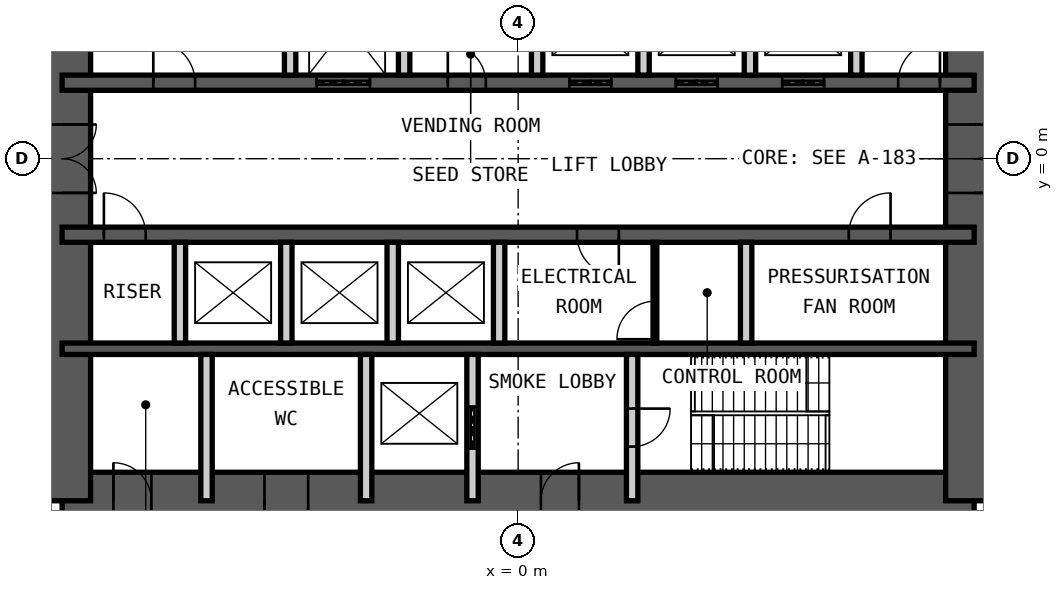
"""IFC4 building model, lengths in metres.
Left out: names, types, materials, properties, quantities, classifications, styles, units other than length and angle.
Written with IfcOpenShell. Run it as: python <this file> out.ifc"""

import sys

from ifc_helpers import new_model, si_unit, direction, frame, frame_2d, origin, place, context, subcontext, project, spatial, rectangle, extrude, element, fill, save


model = new_model("IFC4")
c1 = context("Model", 3, precision=1e-05, world=origin(), true_north=direction((0.0, 1.0)))
c2 = subcontext(c1, "Body", "Model", "MODEL_VIEW")
j1 = project(units=[si_unit("LENGTHUNIT", "METRE"), si_unit("PLANEANGLEUNIT", "RADIAN")], contexts=[c1])
p1 = place(None, origin())
s1 = spatial("IfcSite", under=j1, at=p1, CompositionType="ELEMENT")
p2 = place(p1, origin())
s2 = spatial("IfcBuilding", under=s1, at=p2, CompositionType="ELEMENT")
p3 = place(p2, frame((0.0, 0.0, 87.0)))
s3 = spatial("IfcBuildingStorey", under=s2, at=p3, CompositionType="ELEMENT", Elevation=87.0)
p4 = place(p3, frame((-12.0, -9.0, 0.0), z_axis=(0.0, 0.0, 1.0), x_axis=(1.0, 0.0, 0.0)))
e1 = element("IfcWall", 1, at=p4, inside=s3, PredefinedType="SHEAR", context=c2, shape_type="SweptSolid", body=[
    extrude(rectangle(XDim=24.0, YDim=1.5, at=frame_2d((12.0, 0.0))), origin(), (0.0, 0.0, 1.0), 5.0),
])
p5 = place(p4, frame((1.35, 0.0, 0.0)))
e2 = element("IfcOpeningElement", 2, at=p5, cuts=e1, PredefinedType="OPENING", context=c2, shape_type="SweptSolid", body=[
    extrude(rectangle(XDim=1.0, YDim=2.1, at=frame_2d((0.5, 1.05))), frame((0.0, 0.76, 0.0), z_axis=(0.0, -1.0, 0.0), x_axis=(1.0, 0.0, 0.0)), (0.0, 0.0, 1.0), 1.52),
])
p6 = place(p4, frame((5.325, 0.0, 0.0)))
e3 = element("IfcOpeningElement", 3, at=p6, cuts=e1, PredefinedType="OPENING", context=c2, shape_type="SweptSolid", body=[
    extrude(rectangle(XDim=1.15, YDim=2.1, at=frame_2d((0.575, 1.05))), frame((0.0, 0.76, 0.0), z_axis=(0.0, -1.0, 0.0), x_axis=(1.0, 0.0, 0.0)), (0.0, 0.0, 1.0), 1.52),
])
p7 = place(p4, frame((12.6, 0.0, 0.0)))
e4 = element("IfcOpeningElement", 4, at=p7, cuts=e1, PredefinedType="OPENING", context=c2, shape_type="SweptSolid", body=[
    extrude(rectangle(XDim=1.0, YDim=2.1, at=frame_2d((0.5, 1.05))), frame((0.0, 0.76, 0.0), z_axis=(0.0, -1.0, 0.0), x_axis=(1.0, 0.0, 0.0)), (0.0, 0.0, 1.0), 1.52),
])
p8 = place(p3, frame((12.0, -9.0, 0.0), z_axis=(0.0, 0.0, 1.0), x_axis=(0.0, 1.0, 0.0)))
e5 = element("IfcWall", 5, at=p8, inside=s3, PredefinedType="SHEAR", context=c2, shape_type="SweptSolid", body=[
    extrude(rectangle(XDim=18.0, YDim=1.5, at=frame_2d((9.0, 0.0))), origin(), (0.0, 0.0, 1.0), 5.0),
])
p9 = place(p8, frame((8.1, 0.0, 0.0)))
e6 = element("IfcOpeningElement", 6, at=p9, cuts=e5, PredefinedType="OPENING", context=c2, shape_type="SweptSolid", body=[
    extrude(rectangle(XDim=1.8, YDim=2.1, at=frame_2d((0.9, 1.05))), frame((0.0, 0.76, 0.0), z_axis=(0.0, -1.0, 0.0), x_axis=(1.0, 0.0, 0.0)), (0.0, 0.0, 1.0), 1.52),
])
p10 = place(p3, frame((-12.0, -9.0, 0.0), z_axis=(0.0, 0.0, 1.0), x_axis=(0.0, 1.0, 0.0)))
e7 = element("IfcWall", 7, at=p10, inside=s3, PredefinedType="SHEAR", context=c2, shape_type="SweptSolid", body=[
    extrude(rectangle(XDim=18.0, YDim=1.5, at=frame_2d((9.0, 0.0))), origin(), (0.0, 0.0, 1.0), 5.0),
])
p11 = place(p10, frame((8.1, 0.0, 0.0)))
e8 = element("IfcOpeningElement", 8, at=p11, cuts=e7, PredefinedType="OPENING", context=c2, shape_type="SweptSolid", body=[
    extrude(rectangle(XDim=1.8, YDim=2.1, at=frame_2d((0.9, 1.05))), frame((0.0, 0.76, 0.0), z_axis=(0.0, -1.0, 0.0), x_axis=(1.0, 0.0, 0.0)), (0.0, 0.0, 1.0), 1.52),
])
p12 = place(p3, frame((-12.0, 2.0, 0.0), z_axis=(0.0, 0.0, 1.0), x_axis=(1.0, 0.0, 0.0)))
e9 = element("IfcWall", 9, at=p12, inside=s3, PredefinedType="SHEAR", context=c2, shape_type="SweptSolid", body=[
    extrude(rectangle(XDim=24.0, YDim=0.4, at=frame_2d((12.0, 0.0))), origin(), (0.0, 0.0, 1.0), 5.0),
])
p13 = place(p12, frame((2.4, 0.0, 0.0)))
e10 = element("IfcOpeningElement", 10, at=p13, cuts=e9, PredefinedType="OPENING", context=c2, shape_type="SweptSolid", body=[
    extrude(rectangle(XDim=1.1, YDim=2.1, at=frame_2d((0.55, 1.05))), frame((0.0, 0.21, 0.0), z_axis=(0.0, -1.0, 0.0), x_axis=(1.0, 0.0, 0.0)), (0.0, 0.0, 1.0), 0.42),
])
p14 = place(p12, frame((22.0, 0.0, 0.0)))
e11 = element("IfcOpeningElement", 11, at=p14, cuts=e9, PredefinedType="OPENING", context=c2, shape_type="SweptSolid", body=[
    extrude(rectangle(XDim=1.1, YDim=2.1, at=frame_2d((0.55, 1.05))), frame((0.0, 0.21, 0.0), z_axis=(0.0, -1.0, 0.0), x_axis=(1.0, 0.0, 0.0)), (0.0, 0.0, 1.0), 0.42),
])
p15 = place(p12, frame((10.15, 0.0, 0.0)))
e12 = element("IfcOpeningElement", 12, at=p15, cuts=e9, PredefinedType="OPENING", context=c2, shape_type="SweptSolid", body=[
    extrude(rectangle(XDim=1.0, YDim=2.1, at=frame_2d((0.5, 1.05))), frame((0.0, 0.21, 0.0), z_axis=(0.0, -1.0, 0.0), x_axis=(1.0, 0.0, 0.0)), (0.0, 0.0, 1.0), 0.42),
])
p16 = place(p12, frame((6.7, 0.0, 0.0)))
e13 = element("IfcOpeningElement", 13, at=p16, cuts=e9, PredefinedType="OPENING", context=c2, shape_type="SweptSolid", body=[
    extrude(rectangle(XDim=1.4, YDim=2.4, at=frame_2d((0.7, 1.2))), frame((0.0, 0.21, 0.0), z_axis=(0.0, -1.0, 0.0), x_axis=(1.0, 0.0, 0.0)), (0.0, 0.0, 1.0), 0.42),
])
p17 = place(p12, frame((13.35, 0.0, 0.0)))
e14 = element("IfcOpeningElement", 14, at=p17, cuts=e9, PredefinedType="OPENING", context=c2, shape_type="SweptSolid", body=[
    extrude(rectangle(XDim=1.1, YDim=2.4, at=frame_2d((0.55, 1.2))), frame((0.0, 0.21, 0.0), z_axis=(0.0, -1.0, 0.0), x_axis=(1.0, 0.0, 0.0)), (0.0, 0.0, 1.0), 0.42),
])
p18 = place(p12, frame((16.15, 0.0, 0.0)))
e15 = element("IfcOpeningElement", 15, at=p18, cuts=e9, PredefinedType="OPENING", context=c2, shape_type="SweptSolid", body=[
    extrude(rectangle(XDim=1.1, YDim=2.4, at=frame_2d((0.55, 1.2))), frame((0.0, 0.21, 0.0), z_axis=(0.0, -1.0, 0.0), x_axis=(1.0, 0.0, 0.0)), (0.0, 0.0, 1.0), 0.42),
])
p19 = place(p12, frame((18.95, 0.0, 0.0)))
e16 = element("IfcOpeningElement", 16, at=p19, cuts=e9, PredefinedType="OPENING", context=c2, shape_type="SweptSolid", body=[
    extrude(rectangle(XDim=1.1, YDim=2.4, at=frame_2d((0.55, 1.2))), frame((0.0, 0.21, 0.0), z_axis=(0.0, -1.0, 0.0), x_axis=(1.0, 0.0, 0.0)), (0.0, 0.0, 1.0), 0.42),
])
p20 = place(p3, frame((-12.0, -2.0, 0.0), z_axis=(0.0, 0.0, 1.0), x_axis=(1.0, 0.0, 0.0)))
e17 = element("IfcWall", 17, at=p20, inside=s3, PredefinedType="SHEAR", context=c2, shape_type="SweptSolid", body=[
    extrude(rectangle(XDim=24.0, YDim=0.4, at=frame_2d((12.0, 0.0))), origin(), (0.0, 0.0, 1.0), 5.0),
])
p21 = place(p20, frame((1.1, 0.0, 0.0)))
e18 = element("IfcOpeningElement", 18, at=p21, cuts=e17, PredefinedType="OPENING", context=c2, shape_type="SweptSolid", body=[
    extrude(rectangle(XDim=1.1, YDim=2.1, at=frame_2d((0.55, 1.05))), frame((0.0, 0.21, 0.0), z_axis=(0.0, -1.0, 0.0), x_axis=(1.0, 0.0, 0.0)), (0.0, 0.0, 1.0), 0.42),
])
p22 = place(p20, frame((13.55, 0.0, 0.0)))
e19 = element("IfcOpeningElement", 19, at=p22, cuts=e17, PredefinedType="OPENING", context=c2, shape_type="SweptSolid", body=[
    extrude(rectangle(XDim=1.1, YDim=2.1, at=frame_2d((0.55, 1.05))), frame((0.0, 0.21, 0.0), z_axis=(0.0, -1.0, 0.0), x_axis=(1.0, 0.0, 0.0)), (0.0, 0.0, 1.0), 0.42),
])
p23 = place(p20, frame((20.7, 0.0, 0.0)))
e20 = element("IfcOpeningElement", 20, at=p23, cuts=e17, PredefinedType="OPENING", context=c2, shape_type="SweptSolid", body=[
    extrude(rectangle(XDim=1.1, YDim=2.1, at=frame_2d((0.55, 1.05))), frame((0.0, 0.21, 0.0), z_axis=(0.0, -1.0, 0.0), x_axis=(1.0, 0.0, 0.0)), (0.0, 0.0, 1.0), 0.42),
])
p24 = place(p3, frame((-12.0, -5.0, 0.0), z_axis=(0.0, 0.0, 1.0), x_axis=(1.0, 0.0, 0.0)))
e21 = element("IfcWall", 21, at=p24, inside=s3, PredefinedType="SHEAR", context=c2, shape_type="SweptSolid", body=[
    extrude(rectangle(XDim=24.0, YDim=0.3, at=frame_2d((12.0, 0.0))), origin(), (0.0, 0.0, 1.0), 5.0),
])
for number, where, z_axis, x_axis in (
    (22, (-6.0, 2.2, 0.0), (0.0, 0.0, 1.0), (0.0, 1.0, 0.0)),
    (23, (-3.0, 2.2, 0.0), (0.0, 0.0, 1.0), (0.0, 1.0, 0.0)),
    (24, (0.5, 2.2, 0.0), (0.0, 0.0, 1.0), (0.0, 1.0, 0.0)),
    (25, (3.3, 2.2, 0.0), (0.0, 0.0, 1.0), (0.0, 1.0, 0.0)),
    (26, (6.1, 2.2, 0.0), (0.0, 0.0, 1.0), (0.0, 1.0, 0.0)),
    (27, (8.9, 2.2, 0.0), (0.0, 0.0, 1.0), (0.0, 1.0, 0.0)),
    (28, (-8.9, -4.85, 0.0), (0.0, 0.0, 1.0), (0.0, 1.0, 0.0)),
    (29, (-6.1, -4.85, 0.0), (0.0, 0.0, 1.0), (0.0, 1.0, 0.0)),
    (30, (-3.3, -4.85, 0.0), (0.0, 0.0, 1.0), (0.0, 1.0, 0.0)),
    (31, (-0.5, -4.85, 0.0), (0.0, 0.0, 1.0), (0.0, 1.0, 0.0)),
    (32, (6.0, -4.85, 0.0), (0.0, 0.0, 1.0), (0.0, 1.0, 0.0)),
):
    element("IfcWall", number, at=place(p3, frame(where, z_axis=z_axis, x_axis=x_axis)), inside=s3, PredefinedType="PARTITIONING", context=c2, shape_type="SweptSolid", body=[
        extrude(rectangle(XDim=2.65, YDim=0.3, at=frame_2d((1.325, 0.0))), origin(), (0.0, 0.0, 1.0), 4.78),
    ])
for number, where, z_axis, x_axis in (
    (33, (-8.2, -9.0, 0.0), (0.0, 0.0, 1.0), (0.0, 1.0, 0.0)),
    (34, (-4.0, -9.0, 0.0), (0.0, 0.0, 1.0), (0.0, 1.0, 0.0)),
):
    element("IfcWall", number, at=place(p3, frame(where, z_axis=z_axis, x_axis=x_axis)), inside=s3, PredefinedType="PARTITIONING", context=c2, shape_type="SweptSolid", body=[
        extrude(rectangle(XDim=3.85, YDim=0.3, at=frame_2d((1.925, 0.0))), origin(), (0.0, 0.0, 1.0), 4.78),
    ])
p25 = place(p3, frame((-1.2, -9.0, 0.0), z_axis=(0.0, 0.0, 1.0), x_axis=(0.0, 1.0, 0.0)))
e35 = element("IfcWall", 35, at=p25, inside=s3, PredefinedType="PARTITIONING", context=c2, shape_type="SweptSolid", body=[
    extrude(rectangle(XDim=3.85, YDim=0.3, at=frame_2d((1.925, 0.0))), origin(), (0.0, 0.0, 1.0), 4.78),
])
p26 = place(p25, frame((1.375, 0.0, 0.0)))
e36 = element("IfcOpeningElement", 36, at=p26, cuts=e35, PredefinedType="OPENING", context=c2, shape_type="SweptSolid", body=[
    extrude(rectangle(XDim=1.1, YDim=2.4, at=frame_2d((0.55, 1.2))), frame((0.0, 0.16, 0.0), z_axis=(0.0, -1.0, 0.0), x_axis=(1.0, 0.0, 0.0)), (0.0, 0.0, 1.0), 0.32),
])
p27 = place(p3, frame((3.0, -9.0, 0.0), z_axis=(0.0, 0.0, 1.0), x_axis=(0.0, 1.0, 0.0)))
e37 = element("IfcWall", 37, at=p27, inside=s3, PredefinedType="PARTITIONING", context=c2, shape_type="SweptSolid", body=[
    extrude(rectangle(XDim=3.85, YDim=0.3, at=frame_2d((1.925, 0.0))), origin(), (0.0, 0.0, 1.0), 4.78),
])
p28 = place(p27, frame((1.425, 0.0, 0.0)))
e38 = element("IfcOpeningElement", 38, at=p28, cuts=e37, PredefinedType="OPENING", context=c2, shape_type="SweptSolid", body=[
    extrude(rectangle(XDim=1.0, YDim=2.1, at=frame_2d((0.5, 1.05))), frame((0.0, 0.16, 0.0), z_axis=(0.0, -1.0, 0.0), x_axis=(1.0, 0.0, 0.0)), (0.0, 0.0, 1.0), 0.32),
])
p29 = place(p3, frame((3.6, -4.85, 0.0), z_axis=(0.0, 0.0, 1.0), x_axis=(0.0, 1.0, 0.0)))
e39 = element("IfcWall", 39, at=p29, inside=s3, PredefinedType="PARTITIONING", context=c2, shape_type="SweptSolid", body=[
    extrude(rectangle(XDim=2.65, YDim=0.1, at=frame_2d((1.325, 0.0))), origin(), (0.0, 0.0, 1.0), 4.78),
])
p30 = place(p29, frame((0.1, 0.0, 0.0)))
e40 = element("IfcOpeningElement", 40, at=p30, cuts=e39, PredefinedType="OPENING", context=c2, shape_type="SweptSolid", body=[
    extrude(rectangle(XDim=1.0, YDim=2.4, at=frame_2d((0.5, 1.2))), frame((0.0, 0.06, 0.0), z_axis=(0.0, -1.0, 0.0), x_axis=(1.0, 0.0, 0.0)), (0.0, 0.0, 1.0), 0.12),
])
p31 = place(p5, origin())
e41 = element("IfcDoor", 41, at=p31, inside=s3, OperationType="SINGLE_SWING_RIGHT", PredefinedType="DOOR", context=c2, shape_type="SweptSolid", body=[
    extrude(rectangle(XDim=1.0, YDim=2.1, at=frame_2d((0.5, 1.05))), frame((0.0, 0.025, 0.0), z_axis=(0.0, -1.0, 0.0), x_axis=(1.0, 0.0, 0.0)), (0.0, 0.0, 1.0), 0.05),
])
fill(e2, e41)
p32 = place(p6, origin())
e42 = element("IfcDoor", 42, at=p32, inside=s3, OperationType="SINGLE_SWING_LEFT", PredefinedType="DOOR", context=c2, shape_type="SweptSolid", body=[
    extrude(rectangle(XDim=1.15, YDim=2.1, at=frame_2d((0.575, 1.05))), frame((0.0, 0.025, 0.0), z_axis=(0.0, -1.0, 0.0), x_axis=(1.0, 0.0, 0.0)), (0.0, 0.0, 1.0), 0.05),
])
fill(e3, e42)
p33 = place(p7, origin())
e43 = element("IfcDoor", 43, at=p33, inside=s3, OperationType="SINGLE_SWING_LEFT", PredefinedType="DOOR", context=c2, shape_type="SweptSolid", body=[
    extrude(rectangle(XDim=1.0, YDim=2.1, at=frame_2d((0.5, 1.05))), frame((0.0, 0.025, 0.0), z_axis=(0.0, -1.0, 0.0), x_axis=(1.0, 0.0, 0.0)), (0.0, 0.0, 1.0), 0.05),
])
fill(e4, e43)
p34 = place(p28, origin())
e44 = element("IfcDoor", 44, at=p34, inside=s3, OperationType="SINGLE_SWING_RIGHT", PredefinedType="DOOR", context=c2, shape_type="SweptSolid", body=[
    extrude(rectangle(XDim=1.0, YDim=2.1, at=frame_2d((0.5, 1.05))), frame((0.0, 0.025, 0.0), z_axis=(0.0, -1.0, 0.0), x_axis=(1.0, 0.0, 0.0)), (0.0, 0.0, 1.0), 0.05),
])
fill(e38, e44)
p35 = place(p13, origin())
e45 = element("IfcDoor", 45, at=p35, inside=s3, OperationType="SINGLE_SWING_RIGHT", PredefinedType="DOOR", context=c2, shape_type="SweptSolid", body=[
    extrude(rectangle(XDim=1.1, YDim=2.1, at=frame_2d((0.55, 1.05))), frame((0.0, 0.025, 0.0), z_axis=(0.0, -1.0, 0.0), x_axis=(1.0, 0.0, 0.0)), (0.0, 0.0, 1.0), 0.05),
])
fill(e10, e45)
p36 = place(p21, origin())
e46 = element("IfcDoor", 46, at=p36, inside=s3, OperationType="SINGLE_SWING_RIGHT", PredefinedType="DOOR", context=c2, shape_type="SweptSolid", body=[
    extrude(rectangle(XDim=1.1, YDim=2.1, at=frame_2d((0.55, 1.05))), frame((0.0, 0.025, 0.0), z_axis=(0.0, -1.0, 0.0), x_axis=(1.0, 0.0, 0.0)), (0.0, 0.0, 1.0), 0.05),
])
fill(e18, e46)
p37 = place(p14, origin())
e47 = element("IfcDoor", 47, at=p37, inside=s3, OperationType="SINGLE_SWING_LEFT", PredefinedType="DOOR", context=c2, shape_type="SweptSolid", body=[
    extrude(rectangle(XDim=1.1, YDim=2.1, at=frame_2d((0.55, 1.05))), frame((0.0, 0.025, 0.0), z_axis=(0.0, -1.0, 0.0), x_axis=(1.0, 0.0, 0.0)), (0.0, 0.0, 1.0), 0.05),
])
fill(e11, e47)
p38 = place(p15, origin())
e48 = element("IfcDoor", 48, at=p38, inside=s3, OperationType="SINGLE_SWING_RIGHT", PredefinedType="DOOR", context=c2, shape_type="SweptSolid", body=[
    extrude(rectangle(XDim=1.0, YDim=2.1, at=frame_2d((0.5, 1.05))), frame((0.0, 0.025, 0.0), z_axis=(0.0, -1.0, 0.0), x_axis=(1.0, 0.0, 0.0)), (0.0, 0.0, 1.0), 0.05),
])
fill(e12, e48)
p39 = place(p22, origin())
e49 = element("IfcDoor", 49, at=p39, inside=s3, OperationType="SINGLE_SWING_RIGHT", PredefinedType="DOOR", context=c2, shape_type="SweptSolid", body=[
    extrude(rectangle(XDim=1.1, YDim=2.1, at=frame_2d((0.55, 1.05))), frame((0.0, 0.025, 0.0), z_axis=(0.0, -1.0, 0.0), x_axis=(1.0, 0.0, 0.0)), (0.0, 0.0, 1.0), 0.05),
])
fill(e19, e49)
p40 = place(p23, origin())
e50 = element("IfcDoor", 50, at=p40, inside=s3, OperationType="SINGLE_SWING_LEFT", PredefinedType="DOOR", context=c2, shape_type="SweptSolid", body=[
    extrude(rectangle(XDim=1.1, YDim=2.1, at=frame_2d((0.55, 1.05))), frame((0.0, 0.025, 0.0), z_axis=(0.0, -1.0, 0.0), x_axis=(1.0, 0.0, 0.0)), (0.0, 0.0, 1.0), 0.05),
])
fill(e20, e50)
p41 = place(p9, origin())
e51 = element("IfcDoor", 51, at=p41, inside=s3, OperationType="DOUBLE_DOOR_DOUBLE_SWING", PredefinedType="DOOR", context=c2, shape_type="SweptSolid", body=[
    extrude(rectangle(XDim=1.8, YDim=2.1, at=frame_2d((0.9, 1.05))), frame((0.0, 0.025, 0.0), z_axis=(0.0, -1.0, 0.0), x_axis=(1.0, 0.0, 0.0)), (0.0, 0.0, 1.0), 0.05),
])
fill(e6, e51)
p42 = place(p11, origin())
e52 = element("IfcDoor", 52, at=p42, inside=s3, OperationType="DOUBLE_DOOR_DOUBLE_SWING", PredefinedType="DOOR", context=c2, shape_type="SweptSolid", body=[
    extrude(rectangle(XDim=1.8, YDim=2.1, at=frame_2d((0.9, 1.05))), frame((0.0, 0.025, 0.0), z_axis=(0.0, -1.0, 0.0), x_axis=(1.0, 0.0, 0.0)), (0.0, 0.0, 1.0), 0.05),
])
fill(e8, e52)
p43 = place(p26, origin())
e53 = element("IfcDoor", 53, at=p43, inside=s3, OperationType="DOUBLE_DOOR_SLIDING", PredefinedType="DOOR", context=c2, shape_type="SweptSolid", body=[
    extrude(rectangle(XDim=1.1, YDim=2.4, at=frame_2d((0.55, 1.2))), frame((0.0, 0.025, 0.0), z_axis=(0.0, -1.0, 0.0), x_axis=(1.0, 0.0, 0.0)), (0.0, 0.0, 1.0), 0.05),
])
fill(e36, e53)
p44 = place(p16, origin())
e54 = element("IfcDoor", 54, at=p44, inside=s3, OperationType="DOUBLE_DOOR_SLIDING", PredefinedType="DOOR", context=c2, shape_type="SweptSolid", body=[
    extrude(rectangle(XDim=1.4, YDim=2.4, at=frame_2d((0.7, 1.2))), frame((0.0, 0.025, 0.0), z_axis=(0.0, -1.0, 0.0), x_axis=(1.0, 0.0, 0.0)), (0.0, 0.0, 1.0), 0.05),
])
fill(e13, e54)
p45 = place(p17, origin())
e55 = element("IfcDoor", 55, at=p45, inside=s3, OperationType="DOUBLE_DOOR_SLIDING", PredefinedType="DOOR", context=c2, shape_type="SweptSolid", body=[
    extrude(rectangle(XDim=1.1, YDim=2.4, at=frame_2d((0.55, 1.2))), frame((0.0, 0.025, 0.0), z_axis=(0.0, -1.0, 0.0), x_axis=(1.0, 0.0, 0.0)), (0.0, 0.0, 1.0), 0.05),
])
fill(e14, e55)
p46 = place(p18, origin())
e56 = element("IfcDoor", 56, at=p46, inside=s3, OperationType="DOUBLE_DOOR_SLIDING", PredefinedType="DOOR", context=c2, shape_type="SweptSolid", body=[
    extrude(rectangle(XDim=1.1, YDim=2.4, at=frame_2d((0.55, 1.2))), frame((0.0, 0.025, 0.0), z_axis=(0.0, -1.0, 0.0), x_axis=(1.0, 0.0, 0.0)), (0.0, 0.0, 1.0), 0.05),
])
fill(e15, e56)
p47 = place(p19, origin())
e57 = element("IfcDoor", 57, at=p47, inside=s3, OperationType="DOUBLE_DOOR_SLIDING", PredefinedType="DOOR", context=c2, shape_type="SweptSolid", body=[
    extrude(rectangle(XDim=1.1, YDim=2.4, at=frame_2d((0.55, 1.2))), frame((0.0, 0.025, 0.0), z_axis=(0.0, -1.0, 0.0), x_axis=(1.0, 0.0, 0.0)), (0.0, 0.0, 1.0), 0.05),
])
fill(e16, e57)
p48 = place(p30, origin())
e58 = element("IfcDoor", 58, at=p48, inside=s3, OperationType="SINGLE_SWING_RIGHT", PredefinedType="DOOR", context=c2, shape_type="SweptSolid", body=[
    extrude(rectangle(XDim=1.0, YDim=2.4, at=frame_2d((0.5, 1.2))), frame((0.0, 0.025, 0.0), z_axis=(0.0, -1.0, 0.0), x_axis=(1.0, 0.0, 0.0)), (0.0, 0.0, 1.0), 0.05),
])
fill(e40, e58)
save(model, sys.argv[1])
